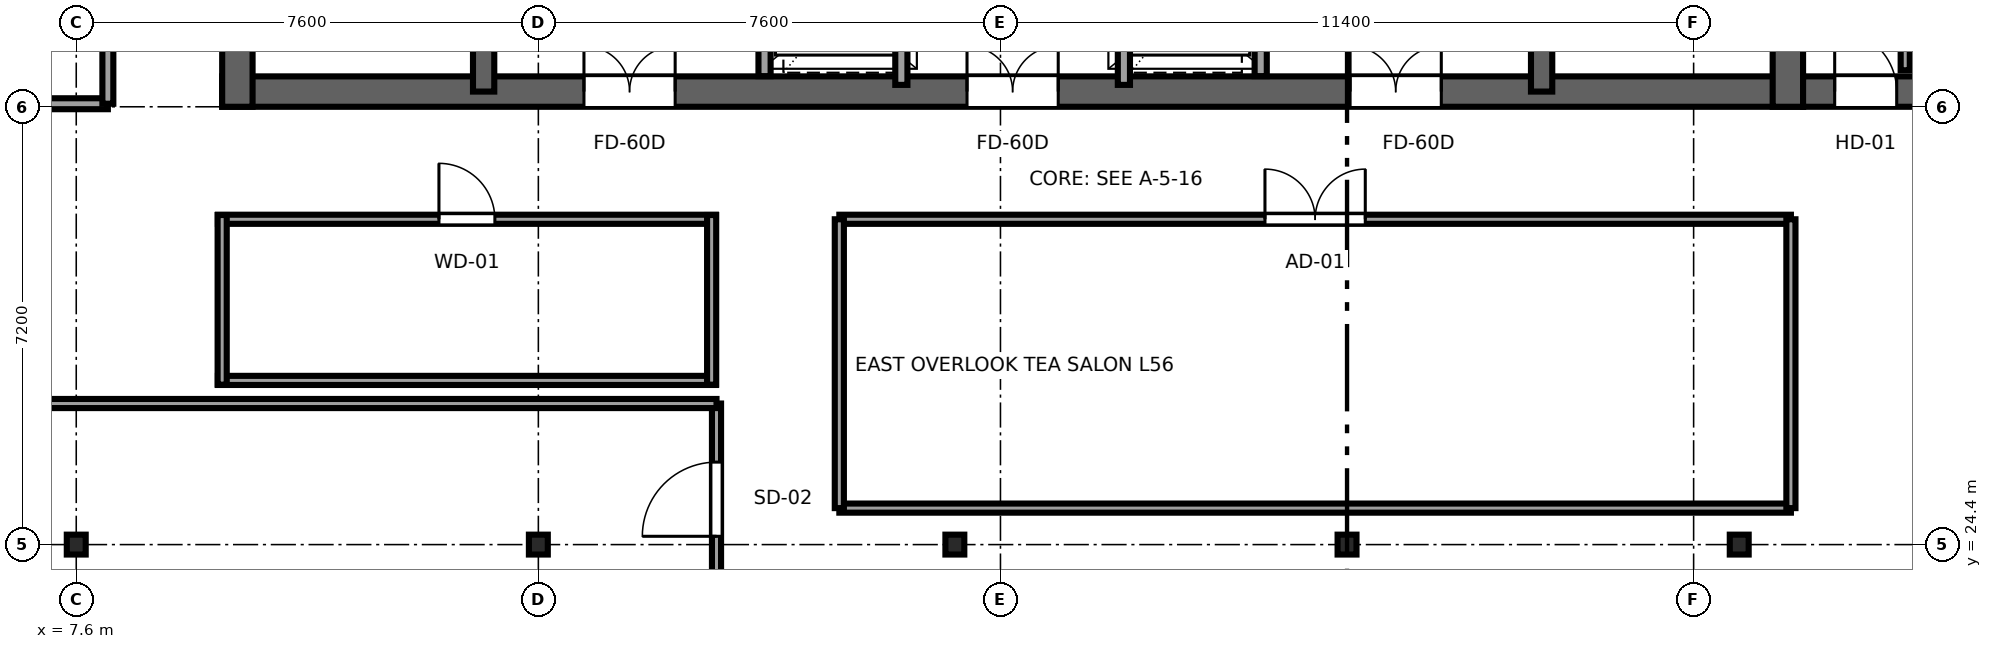
"""IFC4 building model, lengths in metres.
Left out: names, types, materials, properties, quantities, classifications, styles, units other than length and angle.
Written with IfcOpenShell. Run it as: python <this file> out.ifc"""

import sys

from ifc_helpers import new_model, si_unit, direction, frame, frame_2d, origin, origin_2d, place, context, subcontext, project, spatial, rectangle, i_section, extrude, source, transform, mapped, element, fill, save


model = new_model("IFC4")
c1 = context("Model", 3, precision=1e-05, world=origin(), true_north=direction((0.0, 1.0)))
c2 = subcontext(c1, "Body", "Model", "MODEL_VIEW")
j1 = project(units=[si_unit("LENGTHUNIT", "METRE"), si_unit("PLANEANGLEUNIT", "RADIAN")], contexts=[c1])
p1 = place(None, origin())
s1 = spatial("IfcSite", under=j1, at=p1, CompositionType="ELEMENT")
p2 = place(p1, origin())
s2 = spatial("IfcBuilding", under=s1, at=p2, CompositionType="ELEMENT")
p3 = place(p2, frame((0.0, 0.0, 213.25)))
s3 = spatial("IfcBuildingStorey", under=s2, at=p3, CompositionType="ELEMENT", Elevation=213.25)
p4 = place(p3, frame((10.0, 31.85, 0.0), z_axis=(0.0, 0.0, 1.0), x_axis=(1.0, 0.0, 0.0)))
e1 = element("IfcWall", 1, at=p4, inside=s3, PredefinedType="SHEAR", context=c2, shape_type="SweptSolid", body=[
    extrude(rectangle(XDim=26.0, YDim=0.5, at=frame_2d((13.0, 0.0))), origin(), (0.0, 0.0, 1.0), 3.55),
])
p5 = place(p4, frame((7.45, 0.0, 0.0), z_axis=(0.0, 0.0, 1.0), x_axis=(-1.0, 0.0, 0.0)))
e2 = element("IfcOpeningElement", 2, at=p5, cuts=e1, PredefinedType="OPENING", context=c2, shape_type="SweptSolid", body=[
    extrude(rectangle(XDim=1.5, YDim=2.04, at=frame_2d((0.75, 1.02))), frame((0.0, 0.26, 0.0), z_axis=(0.0, -1.0, 0.0), x_axis=(1.0, 0.0, 0.0)), (0.0, 0.0, 1.0), 0.52),
])
p6 = place(p4, frame((13.75, 0.0, 0.0), z_axis=(0.0, 0.0, 1.0), x_axis=(-1.0, 0.0, 0.0)))
e3 = element("IfcOpeningElement", 3, at=p6, cuts=e1, PredefinedType="OPENING", context=c2, shape_type="SweptSolid", body=[
    extrude(rectangle(XDim=1.5, YDim=2.04, at=frame_2d((0.75, 1.02))), frame((0.0, 0.26, 0.0), z_axis=(0.0, -1.0, 0.0), x_axis=(1.0, 0.0, 0.0)), (0.0, 0.0, 1.0), 0.52),
])
p7 = place(p4, frame((20.05, 0.0, 0.0), z_axis=(0.0, 0.0, 1.0), x_axis=(-1.0, 0.0, 0.0)))
e4 = element("IfcOpeningElement", 4, at=p7, cuts=e1, PredefinedType="OPENING", context=c2, shape_type="SweptSolid", body=[
    extrude(rectangle(XDim=1.5, YDim=2.04, at=frame_2d((0.75, 1.02))), frame((0.0, 0.26, 0.0), z_axis=(0.0, -1.0, 0.0), x_axis=(1.0, 0.0, 0.0)), (0.0, 0.0, 1.0), 0.52),
])
for number, where, z_axis, x_axis in (
    (5, (10.25, 31.6, 0.0), (0.0, 0.0, 1.0), (0.0, 1.0, 0.0)),
    (6, (35.75, 31.6, 0.0), (0.0, 0.0, 1.0), (0.0, 1.0, 0.0)),
):
    element("IfcWall", number, at=place(p3, frame(where, z_axis=z_axis, x_axis=x_axis)), inside=s3, PredefinedType="SHEAR", context=c2, shape_type="SweptSolid", body=[
        extrude(rectangle(XDim=13.6, YDim=0.5, at=frame_2d((6.8, 0.0))), origin(), (0.0, 0.0, 1.0), 3.55),
    ])
p8 = place(p3, frame((14.3, 31.85, 0.0), z_axis=(0.0, 0.0, 1.0), x_axis=(0.0, 1.0, 0.0)))
e7 = element("IfcWall", 7, at=p8, inside=s3, PredefinedType="SHEAR", context=c2, shape_type="SweptSolid", body=[
    extrude(rectangle(XDim=13.1, YDim=0.35, at=frame_2d((6.55, 0.0))), origin(), (0.0, 0.0, 1.0), 3.55),
])
p9 = place(p8, frame((0.7, 0.0, 0.0)))
e8 = element("IfcOpeningElement", 8, at=p9, cuts=e7, PredefinedType="OPENING", context=c2, shape_type="SweptSolid", body=[
    extrude(rectangle(XDim=1.1, YDim=2.12, at=frame_2d((0.55, 1.06))), frame((0.0, 0.185, 0.0), z_axis=(0.0, -1.0, 0.0), x_axis=(1.0, 0.0, 0.0)), (0.0, 0.0, 1.0), 0.37),
])
p10 = place(p3, frame((31.7, 31.85, 0.0), z_axis=(0.0, 0.0, 1.0), x_axis=(0.0, 1.0, 0.0)))
e9 = element("IfcWall", 9, at=p10, inside=s3, PredefinedType="SHEAR", context=c2, shape_type="SweptSolid", body=[
    extrude(rectangle(XDim=13.1, YDim=0.35, at=frame_2d((6.55, 0.0))), origin(), (0.0, 0.0, 1.0), 3.55),
])
p11 = place(p10, frame((1.8, 0.0, 0.0), z_axis=(0.0, 0.0, 1.0), x_axis=(-1.0, 0.0, 0.0)))
e10 = element("IfcOpeningElement", 10, at=p11, cuts=e9, PredefinedType="OPENING", context=c2, shape_type="SweptSolid", body=[
    extrude(rectangle(XDim=1.1, YDim=2.12, at=frame_2d((0.55, 1.06))), frame((0.0, 0.185, 0.0), z_axis=(0.0, -1.0, 0.0), x_axis=(1.0, 0.0, 0.0)), (0.0, 0.0, 1.0), 0.37),
])
p12 = place(p3, frame((36.0, 31.85, 0.0), z_axis=(0.0, 0.0, 1.0), x_axis=(1.0, 0.0, 0.0)))
e11 = element("IfcWall", 11, at=p12, inside=s3, PredefinedType="SHEAR", context=c2, shape_type="SweptSolid", body=[
    extrude(rectangle(XDim=3.8, YDim=0.5, at=frame_2d((1.9, 0.0))), origin(), (0.0, 0.0, 1.0), 3.55),
])
p13 = place(p12, frame((1.54, 0.0, 0.0), z_axis=(0.0, 0.0, 1.0), x_axis=(-1.0, 0.0, 0.0)))
e12 = element("IfcOpeningElement", 12, at=p13, cuts=e11, PredefinedType="OPENING", context=c2, shape_type="SweptSolid", body=[
    extrude(rectangle(XDim=1.02, YDim=2.03, at=frame_2d((0.51, 1.015))), frame((0.0, 0.26, 0.0), z_axis=(0.0, -1.0, 0.0), x_axis=(1.0, 0.0, 0.0)), (0.0, 0.0, 1.0), 0.52),
])
m1 = source(origin(), c2, "Body", "SweptSolid", [
    extrude(i_section(OverallWidth=0.311, OverallDepth=0.327, WebThickness=0.016, FlangeThickness=0.025, FilletRadius=0.017, at=origin_2d()), origin(), (0.0, 0.0, 1.0), 3.55),
])
for number, where, z_axis, x_axis in (
    (13, (7.6, 24.4, 0.0), (0.0, 0.0, 1.0), (1.0, 0.0, 0.0)),
    (14, (15.2, 24.4, 0.0), (0.0, 0.0, 1.0), (1.0, 0.0, 0.0)),
    (15, (22.05, 24.4, 0.0), (0.0, 0.0, 1.0), (1.0, 0.0, 0.0)),
    (16, (28.5, 24.4, 0.0), (0.0, 0.0, 1.0), (1.0, 0.0, 0.0)),
    (17, (34.95, 24.4, 0.0), (0.0, 0.0, 1.0), (1.0, 0.0, 0.0)),
):
    element("IfcColumn", number, at=place(p3, frame(where, z_axis=z_axis, x_axis=x_axis)), inside=s3, PredefinedType="COLUMN", context=c2, shape_type="MappedRepresentation", body=[
        mapped(m1, transform((0.0, 0.0, 0.0), x_axis=(1.0, 0.0, 0.0), y_axis=(0.0, 1.0, 0.0), z_axis=(0.0, 0.0, 1.0), scale=1.0)),
    ])
for number, where, z_axis, x_axis in (
    (18, (18.92, 32.104, 0.0), (0.0, 0.0, 1.0), (0.0, 1.0, 0.0)),
    (19, (27.08, 32.104, 0.0), (0.0, 0.0, 1.0), (0.0, 1.0, 0.0)),
):
    element("IfcWall", number, at=place(p3, frame(where, z_axis=z_axis, x_axis=x_axis)), inside=s3, PredefinedType="SOLIDWALL", context=c2, shape_type="SweptSolid", body=[
        extrude(rectangle(XDim=4.046, YDim=0.2, at=frame_2d((2.023, 0.0))), origin(), (0.0, 0.0, 1.0), 3.37),
    ])
p14 = place(p3, frame((21.17, 31.96, 0.0), z_axis=(0.0, 0.0, 1.0), x_axis=(0.0, 1.0, 0.0)))
e20 = element("IfcWall", 20, at=p14, inside=s3, PredefinedType="SOLIDWALL", context=c2, shape_type="SweptSolid", body=[
    extrude(rectangle(XDim=5.08, YDim=0.2, at=frame_2d((2.54, 0.0))), origin(), (0.0, 0.0, 1.0), 3.37),
])
p15 = place(p14, frame((0.74, 0.0, 0.0)))
e21 = element("IfcOpeningElement", 21, at=p15, cuts=e20, PredefinedType="OPENING", context=c2, shape_type="SweptSolid", body=[
    extrude(rectangle(XDim=1.1, YDim=2.12, at=frame_2d((0.55, 1.06))), frame((0.0, 0.11, 0.0), z_axis=(0.0, -1.0, 0.0), x_axis=(1.0, 0.0, 0.0)), (0.0, 0.0, 1.0), 0.22),
])
p16 = place(p14, frame((3.24, 0.0, 0.0)))
e22 = element("IfcOpeningElement", 22, at=p16, cuts=e20, PredefinedType="OPENING", context=c2, shape_type="SweptSolid", body=[
    extrude(rectangle(XDim=1.1, YDim=2.12, at=frame_2d((0.55, 1.06))), frame((0.0, 0.11, 0.0), z_axis=(0.0, -1.0, 0.0), x_axis=(1.0, 0.0, 0.0)), (0.0, 0.0, 1.0), 0.22),
])
p17 = place(p3, frame((24.83, 31.96, 0.0), z_axis=(0.0, 0.0, 1.0), x_axis=(0.0, 1.0, 0.0)))
e23 = element("IfcWall", 23, at=p17, inside=s3, PredefinedType="SOLIDWALL", context=c2, shape_type="SweptSolid", body=[
    extrude(rectangle(XDim=5.08, YDim=0.2, at=frame_2d((2.54, 0.0))), origin(), (0.0, 0.0, 1.0), 3.37),
])
p18 = place(p17, frame((0.74, 0.0, 0.0)))
e24 = element("IfcOpeningElement", 24, at=p18, cuts=e23, PredefinedType="OPENING", context=c2, shape_type="SweptSolid", body=[
    extrude(rectangle(XDim=1.1, YDim=2.12, at=frame_2d((0.55, 1.06))), frame((0.0, 0.11, 0.0), z_axis=(0.0, -1.0, 0.0), x_axis=(1.0, 0.0, 0.0)), (0.0, 0.0, 1.0), 0.22),
])
p19 = place(p17, frame((3.24, 0.0, 0.0)))
e25 = element("IfcOpeningElement", 25, at=p19, cuts=e23, PredefinedType="OPENING", context=c2, shape_type="SweptSolid", body=[
    extrude(rectangle(XDim=1.1, YDim=2.12, at=frame_2d((0.55, 1.06))), frame((0.0, 0.11, 0.0), z_axis=(0.0, -1.0, 0.0), x_axis=(1.0, 0.0, 0.0)), (0.0, 0.0, 1.0), 0.22),
])
p20 = place(p3, frame((37.68, 32.2, 0.0), z_axis=(0.0, 0.0, 1.0), x_axis=(0.0, 1.0, 0.0)))
e26 = element("IfcWall", 26, at=p20, inside=s3, PredefinedType="PARTITIONING", context=c2, shape_type="SweptSolid", body=[
    extrude(rectangle(XDim=8.0, YDim=0.15, at=frame_2d((4.0, 0.0))), origin(), (0.0, 0.0, 1.0), 3.37),
])
p21 = place(p20, frame((3.49, 0.0, 0.0)))
e27 = element("IfcOpeningElement", 27, at=p21, cuts=e26, PredefinedType="OPENING", context=c2, shape_type="SweptSolid", body=[
    extrude(rectangle(XDim=1.02, YDim=2.03, at=frame_2d((0.51, 1.015))), frame((0.0, 0.085, 0.0), z_axis=(0.0, -1.0, 0.0), x_axis=(1.0, 0.0, 0.0)), (0.0, 0.0, 1.0), 0.17),
])
p22 = place(p3, frame((18.13, 23.613, 0.0), z_axis=(0.0, 0.0, 1.0), x_axis=(0.0, 1.0, 0.0)))
e28 = element("IfcWall", 28, at=p22, inside=s3, PredefinedType="PARTITIONING", context=c2, shape_type="SweptSolid", body=[
    extrude(rectangle(XDim=3.107, YDim=0.15, at=frame_2d((1.553, 0.0))), origin(), (0.0, 0.0, 1.0), 3.37),
])
p23 = place(p22, frame((0.924, 0.0, 0.0)))
e29 = element("IfcOpeningElement", 29, at=p23, cuts=e28, PredefinedType="OPENING", context=c2, shape_type="SweptSolid", body=[
    extrude(rectangle(XDim=1.22, YDim=2.08, at=frame_2d((0.61, 1.04))), frame((0.0, 0.085, 0.0), z_axis=(0.0, -1.0, 0.0), x_axis=(1.0, 0.0, 0.0)), (0.0, 0.0, 1.0), 0.17),
])
p24 = place(p3, frame((3.005, 26.72, 0.0), z_axis=(0.0, 0.0, 1.0), x_axis=(1.0, 0.0, 0.0)))
e30 = element("IfcWall", 30, at=p24, inside=s3, PredefinedType="PARTITIONING", context=c2, shape_type="SweptSolid", body=[
    extrude(rectangle(XDim=15.125, YDim=0.15, at=frame_2d((7.562, 0.0))), origin(), (0.0, 0.0, 1.0), 3.37),
])
p25 = place(p3, frame((3.005, 31.65, 0.0), z_axis=(0.0, 0.0, 1.0), x_axis=(1.0, 0.0, 0.0)))
e31 = element("IfcWall", 31, at=p25, inside=s3, PredefinedType="PARTITIONING", context=c2, shape_type="SweptSolid", body=[
    extrude(rectangle(XDim=5.115, YDim=0.18, at=frame_2d((2.558, 0.0))), origin(), (0.0, 0.0, 1.0), 3.37),
])
p26 = place(p3, frame((8.12, 31.65, 0.0), z_axis=(0.0, 0.0, 1.0), x_axis=(0.0, 1.0, 0.0)))
e32 = element("IfcWall", 32, at=p26, inside=s3, PredefinedType="PARTITIONING", context=c2, shape_type="SweptSolid", body=[
    extrude(rectangle(XDim=6.55, YDim=0.18, at=frame_2d((3.275, 0.0))), origin(), (0.0, 0.0, 1.0), 3.37),
])
p27 = place(p26, frame((2.75, 0.0, 0.0)))
e33 = element("IfcOpeningElement", 33, at=p27, cuts=e32, PredefinedType="OPENING", context=c2, shape_type="SweptSolid", body=[
    extrude(rectangle(XDim=1.65, YDim=2.15, at=frame_2d((0.825, 1.075))), frame((0.0, 0.1, 0.0), z_axis=(0.0, -1.0, 0.0), x_axis=(1.0, 0.0, 0.0)), (0.0, 0.0, 1.0), 0.2),
])
p28 = place(p3, frame((9.93, 27.1, 0.0), z_axis=(0.0, 0.0, 1.0), x_axis=(1.0, 0.0, 0.0)))
e34 = element("IfcWall", 34, at=p28, inside=s3, PredefinedType="PARTITIONING", context=c2, shape_type="SweptSolid", body=[
    extrude(rectangle(XDim=8.19, YDim=0.15, at=frame_2d((4.095, 0.0))), origin(), (0.0, 0.0, 1.0), 3.37),
])
p29 = place(p3, frame((9.93, 29.75, 0.0), z_axis=(0.0, 0.0, 1.0), x_axis=(1.0, 0.0, 0.0)))
e35 = element("IfcWall", 35, at=p29, inside=s3, PredefinedType="PARTITIONING", context=c2, shape_type="SweptSolid", body=[
    extrude(rectangle(XDim=8.19, YDim=0.15, at=frame_2d((4.095, 0.0))), origin(), (0.0, 0.0, 1.0), 3.37),
])
p30 = place(p29, frame((3.635, 0.0, 0.0)))
e36 = element("IfcOpeningElement", 36, at=p30, cuts=e35, PredefinedType="OPENING", context=c2, shape_type="SweptSolid", body=[
    extrude(rectangle(XDim=0.92, YDim=2.01, at=frame_2d((0.46, 1.005))), frame((0.0, 0.085, 0.0), z_axis=(0.0, -1.0, 0.0), x_axis=(1.0, 0.0, 0.0)), (0.0, 0.0, 1.0), 0.17),
])
for number, where, z_axis, x_axis in (
    (37, (10.0, 27.03, 0.0), (0.0, 0.0, 1.0), (0.0, 1.0, 0.0)),
    (38, (18.05, 27.03, 0.0), (0.0, 0.0, 1.0), (0.0, 1.0, 0.0)),
):
    element("IfcWall", number, at=place(p3, frame(where, z_axis=z_axis, x_axis=x_axis)), inside=s3, PredefinedType="PARTITIONING", context=c2, shape_type="SweptSolid", body=[
        extrude(rectangle(XDim=2.79, YDim=0.15, at=frame_2d((1.395, 0.0))), origin(), (0.0, 0.0, 1.0), 3.37),
    ])
p31 = place(p3, frame((20.15, 25.0, 0.0), z_axis=(0.0, 0.0, 1.0), x_axis=(1.0, 0.0, 0.0)))
e39 = element("IfcWall", 39, at=p31, inside=s3, PredefinedType="PARTITIONING", context=c2, shape_type="SweptSolid", body=[
    extrude(rectangle(XDim=15.65, YDim=0.15, at=frame_2d((7.825, 0.0))), origin(), (0.0, 0.0, 1.0), 3.37),
])
p32 = place(p3, frame((20.15, 29.75, 0.0), z_axis=(0.0, 0.0, 1.0), x_axis=(1.0, 0.0, 0.0)))
e40 = element("IfcWall", 40, at=p32, inside=s3, PredefinedType="PARTITIONING", context=c2, shape_type="SweptSolid", body=[
    extrude(rectangle(XDim=15.65, YDim=0.15, at=frame_2d((7.825, 0.0))), origin(), (0.0, 0.0, 1.0), 3.37),
])
p33 = place(p32, frame((7.0, 0.0, 0.0)))
e41 = element("IfcOpeningElement", 41, at=p33, cuts=e40, PredefinedType="OPENING", context=c2, shape_type="SweptSolid", body=[
    extrude(rectangle(XDim=1.65, YDim=2.15, at=frame_2d((0.825, 1.075))), frame((0.0, 0.085, 0.0), z_axis=(0.0, -1.0, 0.0), x_axis=(1.0, 0.0, 0.0)), (0.0, 0.0, 1.0), 0.17),
])
for number, where, z_axis, x_axis in (
    (42, (20.15, 25.0, 0.0), (0.0, 0.0, 1.0), (0.0, 1.0, 0.0)),
    (43, (35.8, 25.0, 0.0), (0.0, 0.0, 1.0), (0.0, 1.0, 0.0)),
):
    element("IfcWall", number, at=place(p3, frame(where, z_axis=z_axis, x_axis=x_axis)), inside=s3, PredefinedType="PARTITIONING", context=c2, shape_type="SweptSolid", body=[
        extrude(rectangle(XDim=4.75, YDim=0.15, at=frame_2d((2.375, 0.0))), origin(), (0.0, 0.0, 1.0), 3.37),
    ])
m2 = source(origin(), c2, "Body", "SweptSolid", [
    extrude(rectangle(XDim=1.5, YDim=2.04, at=frame_2d((0.75, 1.02))), frame((0.0, 0.025, 0.0), z_axis=(0.0, -1.0, 0.0), x_axis=(1.0, 0.0, 0.0)), (0.0, 0.0, 1.0), 0.05),
])
p34 = place(p5, origin())
e44 = element("IfcDoor", 44, at=p34, inside=s3, OperationType="DOUBLE_DOOR_SINGLE_SWING", PredefinedType="DOOR", context=c2, shape_type="MappedRepresentation", body=[
    mapped(m2, transform((0.0, 0.0, 0.0), x_axis=(1.0, 0.0, 0.0), y_axis=(0.0, 1.0, 0.0), z_axis=(0.0, 0.0, 1.0), scale=1.0)),
])
fill(e2, e44)
p35 = place(p6, origin())
e45 = element("IfcDoor", 45, at=p35, inside=s3, OperationType="DOUBLE_DOOR_SINGLE_SWING", PredefinedType="DOOR", context=c2, shape_type="MappedRepresentation", body=[
    mapped(m2, transform((0.0, 0.0, 0.0), x_axis=(1.0, 0.0, 0.0), y_axis=(0.0, 1.0, 0.0), z_axis=(0.0, 0.0, 1.0), scale=1.0)),
])
fill(e3, e45)
p36 = place(p7, origin())
e46 = element("IfcDoor", 46, at=p36, inside=s3, OperationType="DOUBLE_DOOR_SINGLE_SWING", PredefinedType="DOOR", context=c2, shape_type="MappedRepresentation", body=[
    mapped(m2, transform((0.0, 0.0, 0.0), x_axis=(1.0, 0.0, 0.0), y_axis=(0.0, 1.0, 0.0), z_axis=(0.0, 0.0, 1.0), scale=1.0)),
])
fill(e4, e46)
m3 = source(origin(), c2, "Body", "SweptSolid", [
    extrude(rectangle(XDim=1.02, YDim=2.03, at=frame_2d((0.51, 1.015))), frame((0.0, 0.025, 0.0), z_axis=(0.0, -1.0, 0.0), x_axis=(1.0, 0.0, 0.0)), (0.0, 0.0, 1.0), 0.05),
])
p37 = place(p13, origin())
e47 = element("IfcDoor", 47, at=p37, inside=s3, OperationType="SINGLE_SWING_LEFT", PredefinedType="DOOR", context=c2, shape_type="MappedRepresentation", body=[
    mapped(m3, transform((0.0, 0.0, 0.0), x_axis=(1.0, 0.0, 0.0), y_axis=(0.0, 1.0, 0.0), z_axis=(0.0, 0.0, 1.0), scale=1.0)),
])
fill(e12, e47)
m4 = source(origin(), c2, "Body", "SweptSolid", [
    extrude(rectangle(XDim=1.22, YDim=2.08, at=frame_2d((0.61, 1.04))), frame((0.0, 0.025, 0.0), z_axis=(0.0, -1.0, 0.0), x_axis=(1.0, 0.0, 0.0)), (0.0, 0.0, 1.0), 0.05),
])
p38 = place(p23, origin())
e48 = element("IfcDoor", 48, at=p38, inside=s3, OperationType="SINGLE_SWING_LEFT", PredefinedType="DOOR", context=c2, shape_type="MappedRepresentation", body=[
    mapped(m4, transform((0.0, 0.0, 0.0), x_axis=(1.0, 0.0, 0.0), y_axis=(0.0, 1.0, 0.0), z_axis=(0.0, 0.0, 1.0), scale=1.0)),
])
fill(e29, e48)
m5 = source(origin(), c2, "Body", "SweptSolid", [
    extrude(rectangle(XDim=0.92, YDim=2.01, at=frame_2d((0.46, 1.005))), frame((0.0, 0.025, 0.0), z_axis=(0.0, -1.0, 0.0), x_axis=(1.0, 0.0, 0.0)), (0.0, 0.0, 1.0), 0.05),
])
p39 = place(p30, origin())
e49 = element("IfcDoor", 49, at=p39, inside=s3, OperationType="SINGLE_SWING_LEFT", PredefinedType="DOOR", context=c2, shape_type="MappedRepresentation", body=[
    mapped(m5, transform((0.0, 0.0, 0.0), x_axis=(1.0, 0.0, 0.0), y_axis=(0.0, 1.0, 0.0), z_axis=(0.0, 0.0, 1.0), scale=1.0)),
])
fill(e36, e49)
m6 = source(origin(), c2, "Body", "SweptSolid", [
    extrude(rectangle(XDim=1.65, YDim=2.15, at=frame_2d((0.825, 1.075))), frame((0.0, 0.025, 0.0), z_axis=(0.0, -1.0, 0.0), x_axis=(1.0, 0.0, 0.0)), (0.0, 0.0, 1.0), 0.05),
])
p40 = place(p33, origin())
e50 = element("IfcDoor", 50, at=p40, inside=s3, OperationType="DOUBLE_DOOR_SINGLE_SWING", PredefinedType="DOOR", context=c2, shape_type="MappedRepresentation", body=[
    mapped(m6, transform((0.0, 0.0, 0.0), x_axis=(1.0, 0.0, 0.0), y_axis=(0.0, 1.0, 0.0), z_axis=(0.0, 0.0, 1.0), scale=1.0)),
])
fill(e41, e50)
save(model, sys.argv[1])
